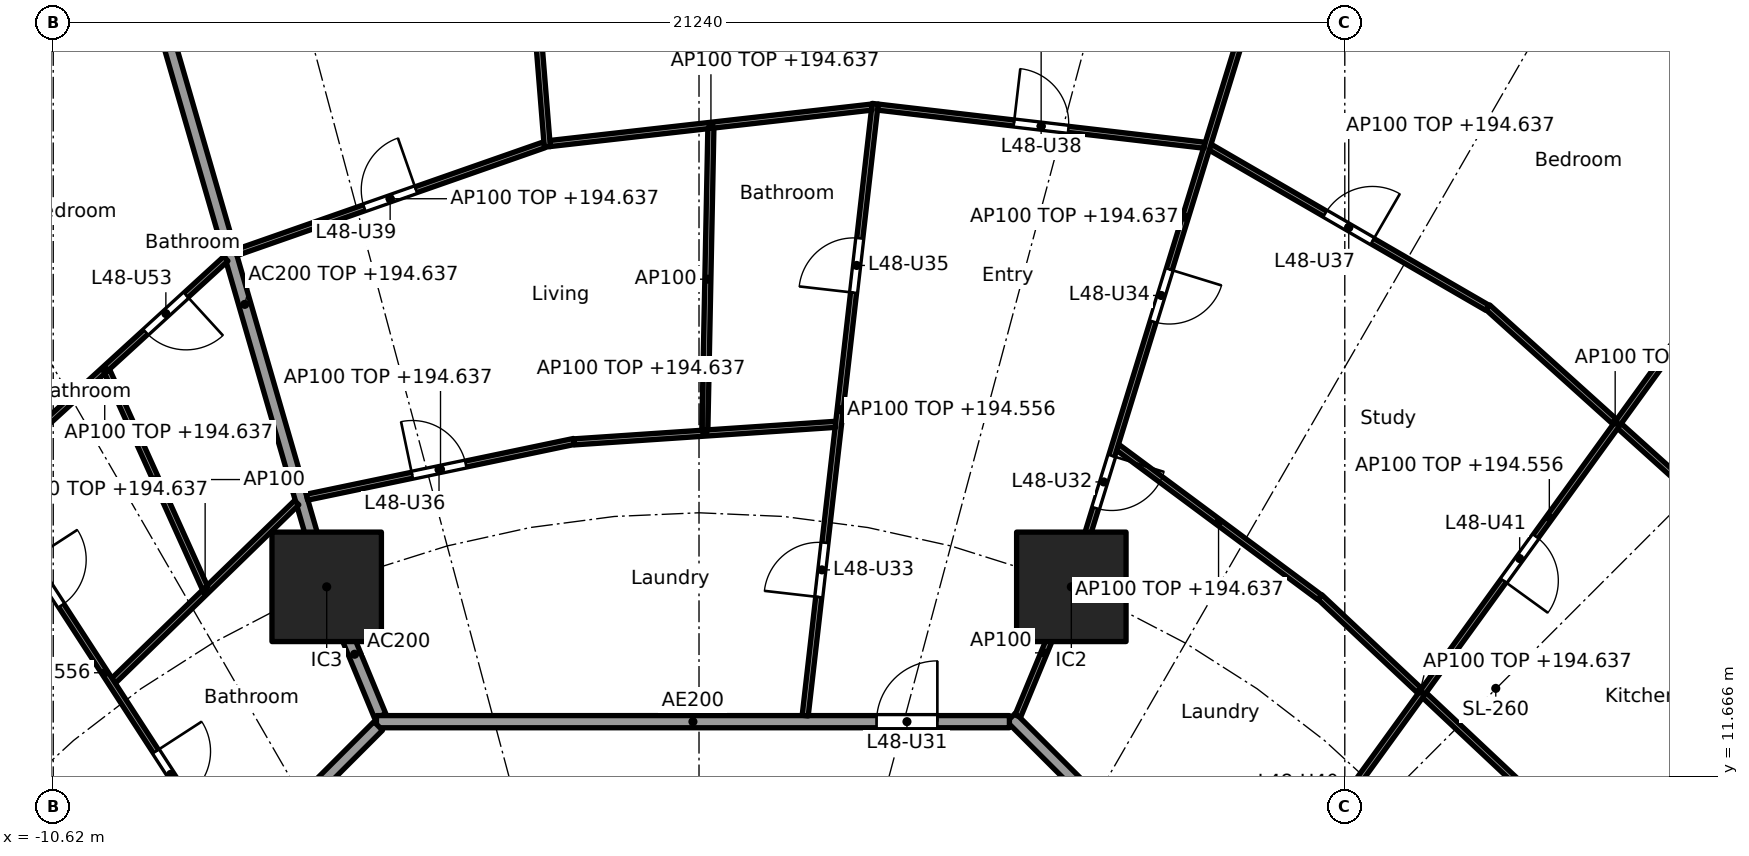
"""IFC4 building model, lengths in metres.
Left out: names, types, materials, properties, quantities, classifications, styles, units other than length and angle.
Written with IfcOpenShell. Run it as: python <this file> out.ifc"""

import sys

from ifc_helpers import new_model, si_unit, direction, frame, frame_2d, origin, origin_2d, place, context, subcontext, project, spatial, rectangle, extrude, element, fill, save


model = new_model("IFC4")
c1 = context("Model", 3, precision=1e-05, world=origin(), true_north=direction((0.0, 1.0)))
c2 = subcontext(c1, "Body", "Model", "MODEL_VIEW")
j1 = project(units=[si_unit("LENGTHUNIT", "METRE"), si_unit("PLANEANGLEUNIT", "RADIAN")], contexts=[c1])
p1 = place(None, origin())
s1 = spatial("IfcSite", under=j1, at=p1, CompositionType="ELEMENT")
p2 = place(p1, origin())
s2 = spatial("IfcBuilding", under=s1, at=p2, CompositionType="ELEMENT")
p3 = place(p2, frame((0.0, 0.0, 191.8)))
s3 = spatial("IfcBuildingStorey", under=s2, at=p3, CompositionType="ELEMENT", Elevation=191.8)
for number, where, z_axis, x_axis in (
    (1, (6.123, 14.782, 0.0), (0.0, 0.0, 1.0), (1.0, 0.0, 0.0)),
    (2, (-6.123, 14.782, 0.0), (0.0, 0.0, 1.0), (1.0, 0.0, 0.0)),
):
    element("IfcColumn", number, at=place(p3, frame(where, z_axis=z_axis, x_axis=x_axis)), inside=s3, PredefinedType="COLUMN", context=c2, shape_type="SweptSolid", body=[
        extrude(rectangle(XDim=1.8, YDim=1.8, at=origin_2d()), origin(), (0.0, 0.0, 1.0), 3.7),
    ])
p4 = place(p3, frame((14.822, 6.154, 0.0), z_axis=(0.0, 0.0, 1.0), x_axis=(0.792203056092, 0.610257583254, 0.0)))
e3 = element("IfcWall", 3, at=p4, inside=s3, PredefinedType="PARTITIONING", context=c2, shape_type="SweptSolid", body=[
    extrude(rectangle(XDim=12.533, YDim=0.2, at=frame_2d((6.266, 0.0))), origin(), (0.0, 0.0, 1.0), 2.837),
])
p5 = place(p3, frame((-5.243, 12.657, 0.0), z_axis=(0.0, 0.0, 1.0), x_axis=(-0.382707856524, 0.923869415315, 0.0)))
e4 = element("IfcWall", 4, at=p5, inside=s3, PredefinedType="PARTITIONING", context=c2, shape_type="SweptSolid", body=[
    extrude(rectangle(XDim=2.2, YDim=0.2, at=frame_2d((1.1, 0.0))), origin(), (0.0, 0.0, 1.0), 3.44),
])
p6 = place(p3, frame((-6.137, 14.83, 0.0), z_axis=(0.0, 0.0, 1.0), x_axis=(-0.278461169897, 0.96044748782, 0.0)))
e5 = element("IfcWall", 5, at=p6, inside=s3, PredefinedType="PARTITIONING", context=c2, shape_type="SweptSolid", body=[
    extrude(rectangle(XDim=9.573, YDim=0.2, at=frame_2d((4.787, 0.0))), origin(), (0.0, 0.0, 1.0), 2.837),
])
p7 = place(p3, frame((12.635, 5.134, 0.0), z_axis=(0.0, 0.0, 1.0), x_axis=(-0.707106781187, 0.707106781187, 0.0)))
e6 = element("IfcWall", 6, at=p7, inside=s3, PredefinedType="PARTITIONING", context=c2, shape_type="SweptSolid", body=[
    extrude(rectangle(XDim=10.609, YDim=0.2, at=frame_2d((5.305, 0.0))), origin(), (0.0, 0.0, 1.0), 3.44),
])
p8 = place(p3, frame((5.104, 12.565, 0.0), z_axis=(0.0, 0.0, 1.0), x_axis=(-1.0, 0.0, 0.0)))
e7 = element("IfcWall", 7, at=p8, inside=s3, PredefinedType="PARTITIONING", context=c2, shape_type="SweptSolid", body=[
    extrude(rectangle(XDim=10.409, YDim=0.2, at=frame_2d((5.205, 0.0))), origin(), (0.0, 0.0, 1.0), 3.44),
])
p9 = place(p8, frame((1.185, 0.0, 0.0)))
e8 = element("IfcOpeningElement", 8, at=p9, cuts=e7, PredefinedType="OPENING", context=c2, shape_type="SweptSolid", body=[
    extrude(rectangle(XDim=1.0, YDim=2.1, at=frame_2d((0.5, 1.05))), frame((0.0, 0.11, 0.0), z_axis=(0.0, -1.0, 0.0), x_axis=(1.0, 0.0, 0.0)), (0.0, 0.0, 1.0), 0.22),
])
p10 = place(p3, frame((-5.275, 12.494, 0.0), z_axis=(0.0, 0.0, 1.0), x_axis=(-0.707106781187, -0.707106781187, 0.0)))
e9 = element("IfcWall", 9, at=p10, inside=s3, PredefinedType="PARTITIONING", context=c2, shape_type="SweptSolid", body=[
    extrude(rectangle(XDim=10.209, YDim=0.2, at=frame_2d((5.104, 0.0))), origin(), (0.0, 0.0, 1.0), 3.44),
])
p11 = place(p10, frame((4.604, 0.0, 0.0)))
e10 = element("IfcOpeningElement", 10, at=p11, cuts=e9, PredefinedType="OPENING", context=c2, shape_type="SweptSolid", body=[
    extrude(rectangle(XDim=1.0, YDim=2.1, at=frame_2d((0.5, 1.05))), frame((0.0, 0.11, 0.0), z_axis=(0.0, -1.0, 0.0), x_axis=(1.0, 0.0, 0.0)), (0.0, 0.0, 1.0), 0.22),
])
p12 = place(p3, frame((13.504, 11.52, 0.0), z_axis=(0.0, 0.0, 1.0), x_axis=(-0.728883199496, 0.684638066055, 0.0)))
e11 = element("IfcWall", 11, at=p12, inside=s3, PredefinedType="PARTITIONING", context=c2, shape_type="SweptSolid", body=[
    extrude(rectangle(XDim=4.519, YDim=0.1, at=frame_2d((2.26, 0.0))), origin(), (0.0, 0.0, 1.0), 2.837),
])
p13 = place(p3, frame((17.162, 15.603, 0.0), z_axis=(0.0, 0.0, 1.0), x_axis=(-0.742768881471, 0.669547898748, 0.0)))
e12 = element("IfcWall", 12, at=p13, inside=s3, PredefinedType="PARTITIONING", context=c2, shape_type="SweptSolid", body=[
    extrude(rectangle(XDim=5.642, YDim=0.1, at=frame_2d((2.821, 0.0))), origin(), (0.0, 0.0, 1.0), 2.837),
])
p14 = place(p3, frame((8.943, 8.966, 0.0), z_axis=(0.0, 0.0, 1.0), x_axis=(0.586803608919, 0.809729290912, 0.0)))
e13 = element("IfcWall", 13, at=p14, inside=s3, PredefinedType="PARTITIONING", context=c2, shape_type="SweptSolid", body=[
    extrude(rectangle(XDim=17.179, YDim=0.1, at=frame_2d((8.589, 0.0))), origin(), (0.0, 0.0, 1.0), 2.756),
])
p15 = place(p14, frame((2.062, 0.0, 0.0)))
e14 = element("IfcOpeningElement", 14, at=p15, cuts=e13, PredefinedType="OPENING", context=c2, shape_type="SweptSolid", body=[
    extrude(rectangle(XDim=0.9, YDim=2.1, at=frame_2d((0.45, 1.05))), frame((0.0, 0.06, 0.0), z_axis=(0.0, -1.0, 0.0), x_axis=(1.0, 0.0, 0.0)), (0.0, 0.0, 1.0), 0.12),
])
p16 = place(p14, frame((7.308, 0.0, 0.0)))
e15 = element("IfcOpeningElement", 15, at=p16, cuts=e13, PredefinedType="OPENING", context=c2, shape_type="SweptSolid", body=[
    extrude(rectangle(XDim=0.9, YDim=2.1, at=frame_2d((0.45, 1.05))), frame((0.0, 0.06, 0.0), z_axis=(0.0, -1.0, 0.0), x_axis=(1.0, 0.0, 0.0)), (0.0, 0.0, 1.0), 0.12),
])
p17 = place(p3, frame((10.207, 14.61, 0.0), z_axis=(0.0, 0.0, 1.0), x_axis=(-0.802784956441, 0.596268659005, 0.0)))
e16 = element("IfcWall", 16, at=p17, inside=s3, PredefinedType="PARTITIONING", context=c2, shape_type="SweptSolid", body=[
    extrude(rectangle(XDim=4.142, YDim=0.1, at=frame_2d((2.071, 0.0))), origin(), (0.0, 0.0, 1.0), 2.837),
])
p18 = place(p3, frame((12.965, 19.371, 0.0), z_axis=(0.0, 0.0, 1.0), x_axis=(-0.865277177388, 0.501293732547, 0.0)))
e17 = element("IfcWall", 17, at=p18, inside=s3, PredefinedType="PARTITIONING", context=c2, shape_type="SweptSolid", body=[
    extrude(rectangle(XDim=5.27, YDim=0.1, at=frame_2d((2.635, 0.0))), origin(), (0.0, 0.0, 1.0), 2.837),
])
p19 = place(p18, frame((2.185, 0.0, 0.0)))
e18 = element("IfcOpeningElement", 18, at=p19, cuts=e17, PredefinedType="OPENING", context=c2, shape_type="SweptSolid", body=[
    extrude(rectangle(XDim=0.9, YDim=2.1, at=frame_2d((0.45, 1.05))), frame((0.0, 0.06, 0.0), z_axis=(0.0, -1.0, 0.0), x_axis=(1.0, 0.0, 0.0)), (0.0, 0.0, 1.0), 0.12),
])
p20 = place(p3, frame((5.243, 12.657, 0.0), z_axis=(0.0, 0.0, 1.0), x_axis=(0.382719158442, 0.923864733477, 0.0)))
e19 = element("IfcWall", 19, at=p20, inside=s3, PredefinedType="PARTITIONING", context=c2, shape_type="SweptSolid", body=[
    extrude(rectangle(XDim=2.25, YDim=0.1, at=frame_2d((1.125, 0.0))), origin(), (0.0, 0.0, 1.0), 3.44),
])
p21 = place(p3, frame((6.138, 14.83, 0.0), z_axis=(0.0, 0.0, 1.0), x_axis=(0.294818517221, 0.955553264818, 0.0)))
e20 = element("IfcWall", 20, at=p21, inside=s3, PredefinedType="PARTITIONING", context=c2, shape_type="SweptSolid", body=[
    extrude(rectangle(XDim=12.619, YDim=0.1, at=frame_2d((6.31, 0.0))), origin(), (0.0, 0.0, 1.0), 2.837),
])
p22 = place(p21, frame((1.306, 0.0, 0.0)))
e21 = element("IfcOpeningElement", 21, at=p22, cuts=e20, PredefinedType="OPENING", context=c2, shape_type="SweptSolid", body=[
    extrude(rectangle(XDim=0.9, YDim=2.1, at=frame_2d((0.45, 1.05))), frame((0.0, 0.06, 0.0), z_axis=(0.0, -1.0, 0.0), x_axis=(1.0, 0.0, 0.0)), (0.0, 0.0, 1.0), 0.12),
])
p23 = place(p21, frame((4.515, 0.0, 0.0)))
e22 = element("IfcOpeningElement", 22, at=p23, cuts=e20, PredefinedType="OPENING", context=c2, shape_type="SweptSolid", body=[
    extrude(rectangle(XDim=0.9, YDim=2.1, at=frame_2d((0.45, 1.05))), frame((0.0, 0.06, 0.0), z_axis=(0.0, -1.0, 0.0), x_axis=(1.0, 0.0, 0.0)), (0.0, 0.0, 1.0), 0.12),
])
p24 = place(p3, frame((8.312, 22.044, 0.0), z_axis=(0.0, 0.0, 1.0), x_axis=(-0.993245806382, 0.1160291692, 0.0)))
e23 = element("IfcWall", 23, at=p24, inside=s3, PredefinedType="PARTITIONING", context=c2, shape_type="SweptSolid", body=[
    extrude(rectangle(XDim=5.408, YDim=0.1, at=frame_2d((2.704, 0.0))), origin(), (0.0, 0.0, 1.0), 2.837),
])
p25 = place(p24, frame((2.254, 0.0, 0.0)))
e24 = element("IfcOpeningElement", 24, at=p25, cuts=e23, PredefinedType="OPENING", context=c2, shape_type="SweptSolid", body=[
    extrude(rectangle(XDim=0.9, YDim=2.1, at=frame_2d((0.45, 1.05))), frame((0.0, 0.06, 0.0), z_axis=(0.0, -1.0, 0.0), x_axis=(1.0, 0.0, 0.0)), (0.0, 0.0, 1.0), 0.12),
])
p26 = place(p3, frame((1.746, 12.664, 0.0), z_axis=(0.0, 0.0, 1.0), x_axis=(0.113629529561, 0.993523190475, 0.0)))
e25 = element("IfcWall", 25, at=p26, inside=s3, PredefinedType="PARTITIONING", context=c2, shape_type="SweptSolid", body=[
    extrude(rectangle(XDim=10.128, YDim=0.1, at=frame_2d((5.064, 0.0))), origin(), (0.0, 0.0, 1.0), 2.756),
])
p27 = place(p26, frame((1.962, 0.0, 0.0)))
e26 = element("IfcOpeningElement", 26, at=p27, cuts=e25, PredefinedType="OPENING", context=c2, shape_type="SweptSolid", body=[
    extrude(rectangle(XDim=0.9, YDim=2.1, at=frame_2d((0.45, 1.05))), frame((0.0, 0.06, 0.0), z_axis=(0.0, -1.0, 0.0), x_axis=(1.0, 0.0, 0.0)), (0.0, 0.0, 1.0), 0.12),
])
p28 = place(p26, frame((7.002, 0.0, 0.0)))
e27 = element("IfcOpeningElement", 27, at=p28, cuts=e25, PredefinedType="OPENING", context=c2, shape_type="SweptSolid", body=[
    extrude(rectangle(XDim=0.9, YDim=2.1, at=frame_2d((0.45, 1.05))), frame((0.0, 0.06, 0.0), z_axis=(0.0, -1.0, 0.0), x_axis=(1.0, 0.0, 0.0)), (0.0, 0.0, 1.0), 0.12),
])
p29 = place(p3, frame((2.244, 17.455, 0.0), z_axis=(0.0, 0.0, 1.0), x_axis=(-0.997754717554, -0.066974051687, 0.0)))
e28 = element("IfcWall", 28, at=p29, inside=s3, PredefinedType="PARTITIONING", context=c2, shape_type="SweptSolid", body=[
    extrude(rectangle(XDim=4.309, YDim=0.1, at=frame_2d((2.154, 0.0))), origin(), (0.0, 0.0, 1.0), 2.837),
])
p30 = place(p3, frame((2.842, 22.671, 0.0), z_axis=(0.0, 0.0, 1.0), x_axis=(-0.993660315081, -0.112424099879, 0.0)))
e29 = element("IfcWall", 29, at=p30, inside=s3, PredefinedType="PARTITIONING", context=c2, shape_type="SweptSolid", body=[
    extrude(rectangle(XDim=5.325, YDim=0.1, at=frame_2d((2.662, 0.0))), origin(), (0.0, 0.0, 1.0), 2.837),
])
p31 = place(p3, frame((0.096, 17.36, 0.0), z_axis=(0.0, 0.0, 1.0), x_axis=(0.019973380305, 0.999800512142, 0.0)))
e30 = element("IfcWall", 30, at=p31, inside=s3, PredefinedType="PARTITIONING", context=c2, shape_type="SweptSolid", body=[
    extrude(rectangle(XDim=4.963, YDim=0.1, at=frame_2d((2.481, 0.0))), origin(), (0.0, 0.0, 1.0), 3.44),
])
p32 = place(p3, frame((-2.056, 17.173, 0.0), z_axis=(0.0, 0.0, 1.0), x_axis=(-0.978902917122, -0.20432591331, 0.0)))
e31 = element("IfcWall", 31, at=p32, inside=s3, PredefinedType="PARTITIONING", context=c2, shape_type="SweptSolid", body=[
    extrude(rectangle(XDim=4.486, YDim=0.1, at=frame_2d((2.243, 0.0))), origin(), (0.0, 0.0, 1.0), 2.837),
])
p33 = place(p32, frame((1.818, 0.0, 0.0)))
e32 = element("IfcOpeningElement", 32, at=p33, cuts=e31, PredefinedType="OPENING", context=c2, shape_type="SweptSolid", body=[
    extrude(rectangle(XDim=0.9, YDim=2.1, at=frame_2d((0.45, 1.05))), frame((0.0, 0.06, 0.0), z_axis=(0.0, -1.0, 0.0), x_axis=(1.0, 0.0, 0.0)), (0.0, 0.0, 1.0), 0.12),
])
p34 = place(p3, frame((-2.495, 22.017, 0.0), z_axis=(0.0, 0.0, 1.0), x_axis=(-0.080150660566, 0.99678276049, 0.0)))
e33 = element("IfcWall", 33, at=p34, inside=s3, PredefinedType="PARTITIONING", context=c2, shape_type="SweptSolid", body=[
    extrude(rectangle(XDim=4.858, YDim=0.1, at=frame_2d((2.429, 0.0))), origin(), (0.0, 0.0, 1.0), 2.837),
])
p35 = place(p3, frame((-2.546, 22.051, 0.0), z_axis=(0.0, 0.0, 1.0), x_axis=(-0.94391294884, -0.330194404878, 0.0)))
e34 = element("IfcWall", 34, at=p35, inside=s3, PredefinedType="PARTITIONING", context=c2, shape_type="SweptSolid", body=[
    extrude(rectangle(XDim=5.367, YDim=0.1, at=frame_2d((2.684, 0.0))), origin(), (0.0, 0.0, 1.0), 2.837),
])
p36 = place(p35, frame((2.234, 0.0, 0.0)))
e35 = element("IfcOpeningElement", 35, at=p36, cuts=e34, PredefinedType="OPENING", context=c2, shape_type="SweptSolid", body=[
    extrude(rectangle(XDim=0.9, YDim=2.1, at=frame_2d((0.45, 1.05))), frame((0.0, 0.06, 0.0), z_axis=(0.0, -1.0, 0.0), x_axis=(1.0, 0.0, 0.0)), (0.0, 0.0, 1.0), 0.12),
])
p37 = place(p3, frame((-6.616, 16.166, 0.0), z_axis=(0.0, 0.0, 1.0), x_axis=(-0.716919058692, -0.697156412352, 0.0)))
e36 = element("IfcWall", 36, at=p37, inside=s3, PredefinedType="PARTITIONING", context=c2, shape_type="SweptSolid", body=[
    extrude(rectangle(XDim=4.2, YDim=0.1, at=frame_2d((2.1, 0.0))), origin(), (0.0, 0.0, 1.0), 2.837),
])
p38 = place(p3, frame((-7.781, 20.178, 0.0), z_axis=(0.0, 0.0, 1.0), x_axis=(-0.73807320557, -0.674720640872, 0.0)))
e37 = element("IfcWall", 37, at=p38, inside=s3, PredefinedType="PARTITIONING", context=c2, shape_type="SweptSolid", body=[
    extrude(rectangle(XDim=5.399, YDim=0.1, at=frame_2d((2.699, 0.0))), origin(), (0.0, 0.0, 1.0), 2.837),
])
p39 = place(p38, frame((0.887, 0.0, 0.0)))
e38 = element("IfcOpeningElement", 38, at=p39, cuts=e37, PredefinedType="OPENING", context=c2, shape_type="SweptSolid", body=[
    extrude(rectangle(XDim=0.9, YDim=2.1, at=frame_2d((0.45, 1.05))), frame((0.0, 0.06, 0.0), z_axis=(0.0, -1.0, 0.0), x_axis=(1.0, 0.0, 0.0)), (0.0, 0.0, 1.0), 0.12),
])
p40 = place(p3, frame((-8.125, 14.765, 0.0), z_axis=(0.0, 0.0, 1.0), x_axis=(-0.411745679848, 0.911298795745, 0.0)))
e39 = element("IfcWall", 39, at=p40, inside=s3, PredefinedType="PARTITIONING", context=c2, shape_type="SweptSolid", body=[
    extrude(rectangle(XDim=3.909, YDim=0.1, at=frame_2d((1.955, 0.0))), origin(), (0.0, 0.0, 1.0), 3.44),
])
p41 = place(p3, frame((-7.712, 10.195, 0.0), z_axis=(0.0, 0.0, 1.0), x_axis=(-0.544179442551, 0.838968851809, 0.0)))
e40 = element("IfcWall", 40, at=p41, inside=s3, PredefinedType="PARTITIONING", context=c2, shape_type="SweptSolid", body=[
    extrude(rectangle(XDim=7.566, YDim=0.1, at=frame_2d((3.783, 0.0))), origin(), (0.0, 0.0, 1.0), 2.756),
])
p42 = place(p41, frame((1.343, 0.0, 0.0)))
e41 = element("IfcOpeningElement", 41, at=p42, cuts=e40, PredefinedType="OPENING", context=c2, shape_type="SweptSolid", body=[
    extrude(rectangle(XDim=0.9, YDim=2.1, at=frame_2d((0.45, 1.05))), frame((0.0, 0.06, 0.0), z_axis=(0.0, -1.0, 0.0), x_axis=(1.0, 0.0, 0.0)), (0.0, 0.0, 1.0), 0.12),
])
p43 = place(p41, frame((5.101, 0.0, 0.0)))
e42 = element("IfcOpeningElement", 42, at=p43, cuts=e40, PredefinedType="OPENING", context=c2, shape_type="SweptSolid", body=[
    extrude(rectangle(XDim=0.9, YDim=2.1, at=frame_2d((0.45, 1.05))), frame((0.0, 0.06, 0.0), z_axis=(0.0, -1.0, 0.0), x_axis=(1.0, 0.0, 0.0)), (0.0, 0.0, 1.0), 0.12),
])
p44 = place(p3, frame((-10.189, 7.721, 0.0), z_axis=(0.0, 0.0, 1.0), x_axis=(-0.773121441079, 0.634258021112, 0.0)))
e43 = element("IfcWall", 43, at=p44, inside=s3, PredefinedType="PARTITIONING", context=c2, shape_type="SweptSolid", body=[
    extrude(rectangle(XDim=6.577, YDim=0.1, at=frame_2d((3.289, 0.0))), origin(), (0.0, 0.0, 1.0), 2.756),
])
p45 = place(p44, frame((1.104, 0.0, 0.0)))
e44 = element("IfcOpeningElement", 44, at=p45, cuts=e43, PredefinedType="OPENING", context=c2, shape_type="SweptSolid", body=[
    extrude(rectangle(XDim=0.9, YDim=2.1, at=frame_2d((0.45, 1.05))), frame((0.0, 0.06, 0.0), z_axis=(0.0, -1.0, 0.0), x_axis=(1.0, 0.0, 0.0)), (0.0, 0.0, 1.0), 0.12),
])
p46 = place(p44, frame((4.367, 0.0, 0.0)))
e45 = element("IfcOpeningElement", 45, at=p46, cuts=e43, PredefinedType="OPENING", context=c2, shape_type="SweptSolid", body=[
    extrude(rectangle(XDim=0.9, YDim=2.1, at=frame_2d((0.45, 1.05))), frame((0.0, 0.06, 0.0), z_axis=(0.0, -1.0, 0.0), x_axis=(1.0, 0.0, 0.0)), (0.0, 0.0, 1.0), 0.12),
])
p47 = place(p9, frame((1.0, 0.0, 0.0), x_axis=(-1.0, 0.0, 0.0)))
e46 = element("IfcDoor", 46, at=p47, inside=s3, OperationType="SINGLE_SWING_RIGHT", PredefinedType="DOOR", context=c2, shape_type="SweptSolid", body=[
    extrude(rectangle(XDim=1.0, YDim=2.1, at=frame_2d((0.5, 1.05))), frame((0.0, 0.025, 0.0), z_axis=(0.0, -1.0, 0.0), x_axis=(1.0, 0.0, 0.0)), (0.0, 0.0, 1.0), 0.05),
])
fill(e8, e46)
p48 = place(p22, frame((0.9, 0.0, 0.0), x_axis=(-1.0, 0.0, 0.0)))
e47 = element("IfcDoor", 47, at=p48, inside=s3, OperationType="SINGLE_SWING_LEFT", PredefinedType="DOOR", context=c2, shape_type="SweptSolid", body=[
    extrude(rectangle(XDim=0.9, YDim=2.1, at=frame_2d((0.45, 1.05))), frame((0.0, 0.025, 0.0), z_axis=(0.0, -1.0, 0.0), x_axis=(1.0, 0.0, 0.0)), (0.0, 0.0, 1.0), 0.05),
])
fill(e21, e47)
p49 = place(p27, origin())
e48 = element("IfcDoor", 48, at=p49, inside=s3, OperationType="SINGLE_SWING_LEFT", PredefinedType="DOOR", context=c2, shape_type="SweptSolid", body=[
    extrude(rectangle(XDim=0.9, YDim=2.1, at=frame_2d((0.45, 1.05))), frame((0.0, 0.025, 0.0), z_axis=(0.0, -1.0, 0.0), x_axis=(1.0, 0.0, 0.0)), (0.0, 0.0, 1.0), 0.05),
])
fill(e26, e48)
p50 = place(p23, frame((0.9, 0.0, 0.0), x_axis=(-1.0, 0.0, 0.0)))
e49 = element("IfcDoor", 49, at=p50, inside=s3, OperationType="SINGLE_SWING_LEFT", PredefinedType="DOOR", context=c2, shape_type="SweptSolid", body=[
    extrude(rectangle(XDim=0.9, YDim=2.1, at=frame_2d((0.45, 1.05))), frame((0.0, 0.025, 0.0), z_axis=(0.0, -1.0, 0.0), x_axis=(1.0, 0.0, 0.0)), (0.0, 0.0, 1.0), 0.05),
])
fill(e22, e49)
p51 = place(p28, origin())
e50 = element("IfcDoor", 50, at=p51, inside=s3, OperationType="SINGLE_SWING_LEFT", PredefinedType="DOOR", context=c2, shape_type="SweptSolid", body=[
    extrude(rectangle(XDim=0.9, YDim=2.1, at=frame_2d((0.45, 1.05))), frame((0.0, 0.025, 0.0), z_axis=(0.0, -1.0, 0.0), x_axis=(1.0, 0.0, 0.0)), (0.0, 0.0, 1.0), 0.05),
])
fill(e27, e50)
p52 = place(p33, frame((0.9, 0.0, 0.0), x_axis=(-1.0, 0.0, 0.0)))
e51 = element("IfcDoor", 51, at=p52, inside=s3, OperationType="SINGLE_SWING_LEFT", PredefinedType="DOOR", context=c2, shape_type="SweptSolid", body=[
    extrude(rectangle(XDim=0.9, YDim=2.1, at=frame_2d((0.45, 1.05))), frame((0.0, 0.025, 0.0), z_axis=(0.0, -1.0, 0.0), x_axis=(1.0, 0.0, 0.0)), (0.0, 0.0, 1.0), 0.05),
])
fill(e32, e51)
p53 = place(p19, frame((0.9, 0.0, 0.0), x_axis=(-1.0, 0.0, 0.0)))
e52 = element("IfcDoor", 52, at=p53, inside=s3, OperationType="SINGLE_SWING_RIGHT", PredefinedType="DOOR", context=c2, shape_type="SweptSolid", body=[
    extrude(rectangle(XDim=0.9, YDim=2.1, at=frame_2d((0.45, 1.05))), frame((0.0, 0.025, 0.0), z_axis=(0.0, -1.0, 0.0), x_axis=(1.0, 0.0, 0.0)), (0.0, 0.0, 1.0), 0.05),
])
fill(e18, e52)
p54 = place(p25, frame((0.9, 0.0, 0.0), x_axis=(-1.0, 0.0, 0.0)))
e53 = element("IfcDoor", 53, at=p54, inside=s3, OperationType="SINGLE_SWING_LEFT", PredefinedType="DOOR", context=c2, shape_type="SweptSolid", body=[
    extrude(rectangle(XDim=0.9, YDim=2.1, at=frame_2d((0.45, 1.05))), frame((0.0, 0.025, 0.0), z_axis=(0.0, -1.0, 0.0), x_axis=(1.0, 0.0, 0.0)), (0.0, 0.0, 1.0), 0.05),
])
fill(e24, e53)
p55 = place(p36, frame((0.9, 0.0, 0.0), x_axis=(-1.0, 0.0, 0.0)))
e54 = element("IfcDoor", 54, at=p55, inside=s3, OperationType="SINGLE_SWING_RIGHT", PredefinedType="DOOR", context=c2, shape_type="SweptSolid", body=[
    extrude(rectangle(XDim=0.9, YDim=2.1, at=frame_2d((0.45, 1.05))), frame((0.0, 0.025, 0.0), z_axis=(0.0, -1.0, 0.0), x_axis=(1.0, 0.0, 0.0)), (0.0, 0.0, 1.0), 0.05),
])
fill(e35, e54)
p56 = place(p16, frame((0.9, 0.0, 0.0), x_axis=(-1.0, 0.0, 0.0)))
e55 = element("IfcDoor", 55, at=p56, inside=s3, OperationType="SINGLE_SWING_RIGHT", PredefinedType="DOOR", context=c2, shape_type="SweptSolid", body=[
    extrude(rectangle(XDim=0.9, YDim=2.1, at=frame_2d((0.45, 1.05))), frame((0.0, 0.025, 0.0), z_axis=(0.0, -1.0, 0.0), x_axis=(1.0, 0.0, 0.0)), (0.0, 0.0, 1.0), 0.05),
])
fill(e15, e55)
p57 = place(p42, frame((0.9, 0.0, 0.0), x_axis=(-1.0, 0.0, 0.0)))
e56 = element("IfcDoor", 56, at=p57, inside=s3, OperationType="SINGLE_SWING_LEFT", PredefinedType="DOOR", context=c2, shape_type="SweptSolid", body=[
    extrude(rectangle(XDim=0.9, YDim=2.1, at=frame_2d((0.45, 1.05))), frame((0.0, 0.025, 0.0), z_axis=(0.0, -1.0, 0.0), x_axis=(1.0, 0.0, 0.0)), (0.0, 0.0, 1.0), 0.05),
])
fill(e41, e56)
p58 = place(p43, frame((0.9, 0.0, 0.0), x_axis=(-1.0, 0.0, 0.0)))
e57 = element("IfcDoor", 57, at=p58, inside=s3, OperationType="SINGLE_SWING_LEFT", PredefinedType="DOOR", context=c2, shape_type="SweptSolid", body=[
    extrude(rectangle(XDim=0.9, YDim=2.1, at=frame_2d((0.45, 1.05))), frame((0.0, 0.025, 0.0), z_axis=(0.0, -1.0, 0.0), x_axis=(1.0, 0.0, 0.0)), (0.0, 0.0, 1.0), 0.05),
])
fill(e42, e57)
p59 = place(p39, origin())
e58 = element("IfcDoor", 58, at=p59, inside=s3, OperationType="SINGLE_SWING_LEFT", PredefinedType="DOOR", context=c2, shape_type="SweptSolid", body=[
    extrude(rectangle(XDim=0.9, YDim=2.1, at=frame_2d((0.45, 1.05))), frame((0.0, 0.025, 0.0), z_axis=(0.0, -1.0, 0.0), x_axis=(1.0, 0.0, 0.0)), (0.0, 0.0, 1.0), 0.05),
])
fill(e38, e58)
save(model, sys.argv[1])
